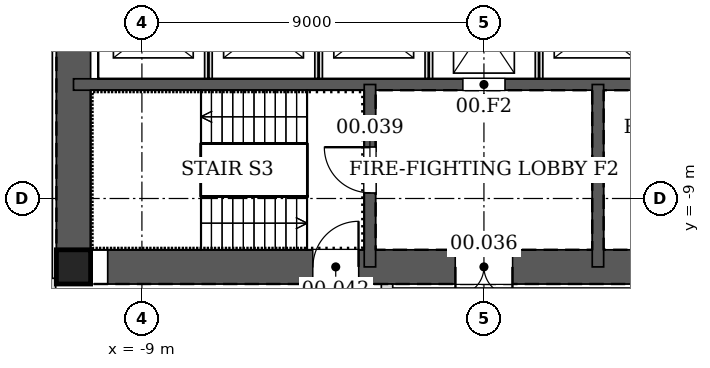
"""IFC4 building model, lengths in metres.
Left out: names, types, materials, properties, quantities, classifications, styles, units other than length and angle.
Written with IfcOpenShell. Run it as: python <this file> out.ifc"""

import sys

from ifc_helpers import new_model, si_unit, direction, frame, frame_2d, origin, origin_2d, place, context, subcontext, project, spatial, rectangle, hollow_rectangle, extrude, element, fill, save


model = new_model("IFC4")
c1 = context("Model", 3, precision=1e-05, world=origin(), true_north=direction((0.0, 1.0)))
c2 = subcontext(c1, "Body", "Model", "MODEL_VIEW")
j1 = project(units=[si_unit("LENGTHUNIT", "METRE"), si_unit("PLANEANGLEUNIT", "RADIAN")], contexts=[c1])
p1 = place(None, origin())
s1 = spatial("IfcSite", under=j1, at=p1, CompositionType="ELEMENT")
p2 = place(p1, origin())
s2 = spatial("IfcBuilding", under=s1, at=p2, CompositionType="ELEMENT")
p3 = place(p2, origin())
s3 = spatial("IfcBuildingStorey", under=s2, at=p3, CompositionType="ELEMENT", Elevation=0.0)
p4 = place(p3, frame((-10.8, -10.8, 0.0), z_axis=(0.0, 0.0, 1.0), x_axis=(1.0, 0.0, 0.0)))
e1 = element("IfcColumn", 1, at=p4, inside=s3, PredefinedType="COLUMN", context=c2, shape_type="SweptSolid", body=[
    extrude(hollow_rectangle(XDim=0.9, YDim=0.9, WallThickness=0.06, at=origin_2d()), origin(), (0.0, 0.0, 1.0), 7.2),
])
p5 = place(p3, frame((-10.8, -10.8, 0.0), z_axis=(0.0, 0.0, 1.0), x_axis=(1.0, 0.0, 0.0)))
e2 = element("IfcWall", 2, at=p5, inside=s3, PredefinedType="SOLIDWALL", context=c2, shape_type="SweptSolid", body=[
    extrude(rectangle(XDim=21.6, YDim=0.9, at=frame_2d((10.8, 0.0))), origin(), (0.0, 0.0, 1.0), 7.2),
])
p6 = place(p5, frame((10.05, 0.0, 0.0)))
e3 = element("IfcOpeningElement", 3, at=p6, cuts=e2, PredefinedType="OPENING", context=c2, shape_type="SweptSolid", body=[
    extrude(rectangle(XDim=1.5, YDim=2.1, at=frame_2d((0.75, 1.05))), frame((0.0, 0.46, 0.0), z_axis=(0.0, -1.0, 0.0), x_axis=(1.0, 0.0, 0.0)), (0.0, 0.0, 1.0), 0.92),
])
p7 = place(p5, frame((6.3, 0.0, 0.0)))
e4 = element("IfcOpeningElement", 4, at=p7, cuts=e2, PredefinedType="OPENING", context=c2, shape_type="SweptSolid", body=[
    extrude(rectangle(XDim=1.2, YDim=2.1, at=frame_2d((0.6, 1.05))), frame((0.0, 0.46, 0.0), z_axis=(0.0, -1.0, 0.0), x_axis=(1.0, 0.0, 0.0)), (0.0, 0.0, 1.0), 0.92),
])
p8 = place(p5, frame((17.1, 0.0, 0.0)))
e5 = element("IfcOpeningElement", 5, at=p8, cuts=e2, PredefinedType="OPENING", context=c2, shape_type="SweptSolid", body=[
    extrude(rectangle(XDim=0.9, YDim=2.1, at=frame_2d((0.45, 1.05))), frame((0.0, 0.46, 0.0), z_axis=(0.0, -1.0, 0.0), x_axis=(1.0, 0.0, 0.0)), (0.0, 0.0, 1.0), 0.92),
])
p9 = place(p3, frame((-10.8, 10.8, 0.0), z_axis=(0.0, 0.0, 1.0), x_axis=(0.0, -1.0, 0.0)))
e6 = element("IfcWall", 6, at=p9, inside=s3, PredefinedType="SOLIDWALL", context=c2, shape_type="SweptSolid", body=[
    extrude(rectangle(XDim=21.6, YDim=0.9, at=frame_2d((10.8, 0.0))), origin(), (0.0, 0.0, 1.0), 7.2),
])
p10 = place(p9, frame((8.7, 0.0, 0.0)))
e7 = element("IfcOpeningElement", 7, at=p10, cuts=e6, PredefinedType="OPENING", context=c2, shape_type="SweptSolid", body=[
    extrude(rectangle(XDim=1.2, YDim=2.1, at=frame_2d((0.6, 1.05))), frame((0.0, 0.46, 0.0), z_axis=(0.0, -1.0, 0.0), x_axis=(1.0, 0.0, 0.0)), (0.0, 0.0, 1.0), 0.92),
])
p11 = place(p9, frame((11.7, 0.0, 0.0)))
e8 = element("IfcOpeningElement", 8, at=p11, cuts=e6, PredefinedType="OPENING", context=c2, shape_type="SweptSolid", body=[
    extrude(rectangle(XDim=1.2, YDim=2.1, at=frame_2d((0.6, 1.05))), frame((0.0, 0.46, 0.0), z_axis=(0.0, -1.0, 0.0), x_axis=(1.0, 0.0, 0.0)), (0.0, 0.0, 1.0), 0.92),
])
p12 = place(p3, frame((-10.8, -6.0, 0.0), z_axis=(0.0, 0.0, 1.0), x_axis=(1.0, 0.0, 0.0)))
e9 = element("IfcWall", 9, at=p12, inside=s3, PredefinedType="SOLIDWALL", context=c2, shape_type="SweptSolid", body=[
    extrude(rectangle(XDim=21.6, YDim=0.3, at=frame_2d((10.8, 0.0))), origin(), (0.0, 0.0, 1.0), 7.2),
])
p13 = place(p12, frame((10.25, 0.0, 0.0)))
e10 = element("IfcOpeningElement", 10, at=p13, cuts=e9, PredefinedType="OPENING", context=c2, shape_type="SweptSolid", body=[
    extrude(rectangle(XDim=1.1, YDim=2.1, at=frame_2d((0.55, 1.05))), frame((0.0, 0.16, 0.0), z_axis=(0.0, -1.0, 0.0), x_axis=(1.0, 0.0, 0.0)), (0.0, 0.0, 1.0), 0.32),
])
p14 = place(p3, frame((-3.0, -6.0, 0.0), z_axis=(0.0, 0.0, 1.0), x_axis=(0.0, -1.0, 0.0)))
e11 = element("IfcWall", 11, at=p14, inside=s3, PredefinedType="SOLIDWALL", context=c2, shape_type="SweptSolid", body=[
    extrude(rectangle(XDim=4.8, YDim=0.3, at=frame_2d((2.4, 0.0))), origin(), (0.0, 0.0, 1.0), 7.2),
])
p15 = place(p14, frame((1.65, 0.0, 0.0)))
e12 = element("IfcOpeningElement", 12, at=p15, cuts=e11, PredefinedType="OPENING", context=c2, shape_type="SweptSolid", body=[
    extrude(rectangle(XDim=1.2, YDim=2.1, at=frame_2d((0.6, 1.05))), frame((0.0, 0.16, 0.0), z_axis=(0.0, -1.0, 0.0), x_axis=(1.0, 0.0, 0.0)), (0.0, 0.0, 1.0), 0.32),
])
p16 = place(p3, frame((3.0, -6.0, 0.0), z_axis=(0.0, 0.0, 1.0), x_axis=(0.0, -1.0, 0.0)))
e13 = element("IfcWall", 13, at=p16, inside=s3, PredefinedType="SOLIDWALL", context=c2, shape_type="SweptSolid", body=[
    extrude(rectangle(XDim=4.8, YDim=0.3, at=frame_2d((2.4, 0.0))), origin(), (0.0, 0.0, 1.0), 7.2),
])
p17 = place(p3, frame((-11.269, -11.25, 0.0), z_axis=(0.0, 0.0, 1.0), x_axis=(-1.0, 0.0, 0.0)))
e14 = element("IfcWall", 14, at=p17, inside=s3, PredefinedType="PARTITIONING", context=c2, shape_type="SweptSolid", body=[
    extrude(rectangle(XDim=3.631, YDim=0.3, at=frame_2d((1.815, 0.0))), origin(), (0.0, 0.0, 1.0), 5.59),
])
p18 = place(p3, frame((-2.55, -13.4, 0.0), z_axis=(0.0, 0.0, 1.0), x_axis=(0.0, 1.0, 0.0)))
e15 = element("IfcWall", 15, at=p18, inside=s3, PredefinedType="PARTITIONING", context=c2, shape_type="SweptSolid", body=[
    extrude(rectangle(XDim=2.15, YDim=0.3, at=frame_2d((1.075, 0.0))), origin(), (0.0, 0.0, 1.0), 6.9),
])
for number, where, z_axis, x_axis in (
    (16, (-7.25, -5.85, 0.0), (0.0, 0.0, 1.0), (0.0, 1.0, 0.0)),
    (17, (-4.35, -5.85, 0.0), (0.0, 0.0, 1.0), (0.0, 1.0, 0.0)),
    (18, (-1.45, -5.85, 0.0), (0.0, 0.0, 1.0), (0.0, 1.0, 0.0)),
    (19, (1.45, -5.85, 0.0), (0.0, 0.0, 1.0), (0.0, 1.0, 0.0)),
):
    element("IfcWall", number, at=place(p3, frame(where, z_axis=z_axis, x_axis=x_axis)), inside=s3, PredefinedType="PARTITIONING", context=c2, shape_type="SweptSolid", body=[
        extrude(rectangle(XDim=2.7, YDim=0.2, at=frame_2d((1.35, 0.0))), origin(), (0.0, 0.0, 1.0), 7.2),
    ])
p19 = place(p6, frame((1.5, 0.0, 0.0), z_axis=(0.0, 0.0, 1.0), x_axis=(-1.0, 0.0, 0.0)))
e20 = element("IfcDoor", 20, at=p19, inside=s3, OperationType="DOUBLE_DOOR_SINGLE_SWING", PredefinedType="DOOR", context=c2, shape_type="SweptSolid", body=[
    extrude(rectangle(XDim=1.5, YDim=2.1, at=frame_2d((0.75, 1.05))), frame((0.0, 0.025, 0.0), z_axis=(0.0, -1.0, 0.0), x_axis=(1.0, 0.0, 0.0)), (0.0, 0.0, 1.0), 0.05),
])
fill(e3, e20)
p20 = place(p15, frame((1.2, 0.0, 0.0), z_axis=(0.0, 0.0, 1.0), x_axis=(-1.0, 0.0, 0.0)))
e21 = element("IfcDoor", 21, at=p20, inside=s3, OperationType="SINGLE_SWING_RIGHT", PredefinedType="DOOR", context=c2, shape_type="SweptSolid", body=[
    extrude(rectangle(XDim=1.2, YDim=2.1, at=frame_2d((0.6, 1.05))), frame((0.0, 0.025, 0.0), z_axis=(0.0, -1.0, 0.0), x_axis=(1.0, 0.0, 0.0)), (0.0, 0.0, 1.0), 0.05),
])
fill(e12, e21)
p21 = place(p7, origin())
e22 = element("IfcDoor", 22, at=p21, inside=s3, OperationType="SINGLE_SWING_RIGHT", PredefinedType="DOOR", context=c2, shape_type="SweptSolid", body=[
    extrude(rectangle(XDim=1.2, YDim=2.1, at=frame_2d((0.6, 1.05))), frame((0.0, 0.025, 0.0), z_axis=(0.0, -1.0, 0.0), x_axis=(1.0, 0.0, 0.0)), (0.0, 0.0, 1.0), 0.05),
])
fill(e4, e22)
p22 = place(p13, origin())
e23 = element("IfcDoor", 23, at=p22, inside=s3, OperationType="DOUBLE_DOOR_SLIDING", PredefinedType="DOOR", context=c2, shape_type="SweptSolid", body=[
    extrude(rectangle(XDim=1.1, YDim=2.1, at=frame_2d((0.55, 1.05))), frame((0.0, 0.025, 0.0), z_axis=(0.0, -1.0, 0.0), x_axis=(1.0, 0.0, 0.0)), (0.0, 0.0, 1.0), 0.05),
])
fill(e10, e23)
save(model, sys.argv[1])
